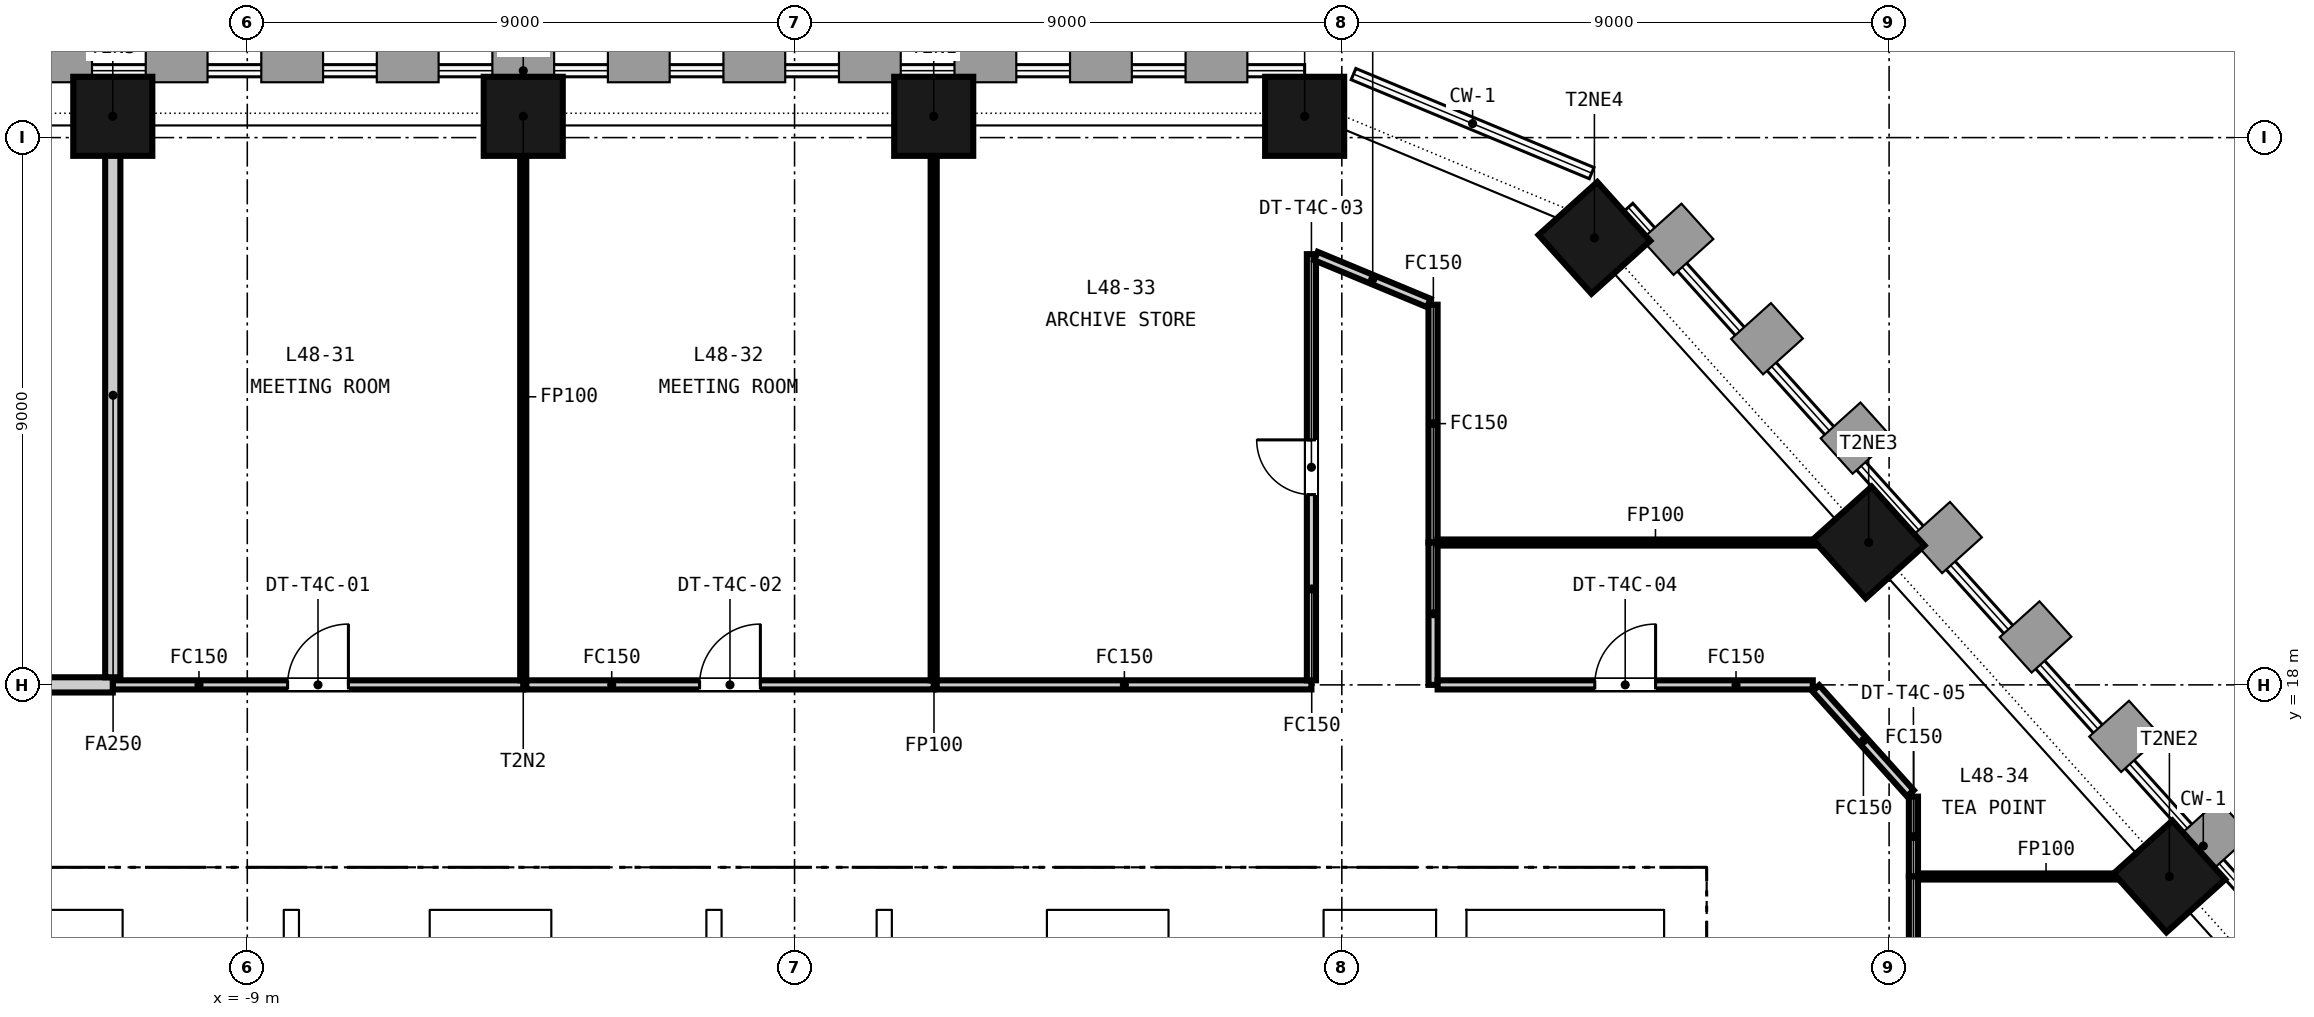
"""IFC4 building model, lengths in metres.
Left out: names, types, materials, properties, quantities, classifications, styles, units other than length and angle.
Written with IfcOpenShell. Run it as: python <this file> out.ifc"""

import sys

from ifc_helpers import new_model, si_unit, direction, frame, frame_2d, origin, origin_2d, place, context, subcontext, project, spatial, rectangle, extrude, element, fill, save


model = new_model("IFC4")
c1 = context("Model", 3, precision=1e-05, world=origin(), true_north=direction((0.0, 1.0)))
c2 = subcontext(c1, "Body", "Model", "MODEL_VIEW")
j1 = project(units=[si_unit("LENGTHUNIT", "METRE"), si_unit("PLANEANGLEUNIT", "RADIAN")], contexts=[c1])
p1 = place(None, origin())
s1 = spatial("IfcSite", under=j1, at=p1, CompositionType="ELEMENT")
p2 = place(p1, origin())
s2 = spatial("IfcBuilding", under=s1, at=p2, CompositionType="ELEMENT")
p3 = place(p2, frame((0.0, 0.0, 192.7)))
s3 = spatial("IfcBuildingStorey", under=s2, at=p3, CompositionType="ELEMENT", Elevation=192.7)
p4 = place(p3, frame((-15.0, 14.65, -0.15), z_axis=(0.0, 0.0, 1.0), x_axis=(1.0, 0.0, 0.0)))
e1 = element("IfcWall", 1, at=p4, inside=s3, PredefinedType="SOLIDWALL", context=c2, shape_type="SweptSolid", body=[
    extrude(rectangle(XDim=30.0, YDim=0.7, at=frame_2d((15.0, 0.0))), origin(), (0.0, 0.0, 1.0), 3.65),
])
p5 = place(p4, frame((9.25, 0.0, 0.15)))
e2 = element("IfcOpeningElement", 2, at=p5, cuts=e1, PredefinedType="OPENING", context=c2, shape_type="SweptSolid", body=[
    extrude(rectangle(XDim=1.5, YDim=2.1, at=frame_2d((0.75, 1.05))), frame((0.0, 0.36, 0.0), z_axis=(0.0, -1.0, 0.0), x_axis=(1.0, 0.0, 0.0)), (0.0, 0.0, 1.0), 0.72),
])
p6 = place(p4, frame((19.4, 0.0, 0.15)))
e3 = element("IfcOpeningElement", 3, at=p6, cuts=e1, PredefinedType="OPENING", context=c2, shape_type="SweptSolid", body=[
    extrude(rectangle(XDim=1.5, YDim=2.1, at=frame_2d((0.75, 1.05))), frame((0.0, 0.36, 0.0), z_axis=(0.0, -1.0, 0.0), x_axis=(1.0, 0.0, 0.0)), (0.0, 0.0, 1.0), 0.72),
])
p7 = place(p4, frame((1.5, 0.0, 0.15)))
e4 = element("IfcOpeningElement", 4, at=p7, cuts=e1, PredefinedType="OPENING", context=c2, shape_type="SweptSolid", body=[
    extrude(rectangle(XDim=1.2, YDim=2.1, at=frame_2d((0.6, 1.05))), frame((0.0, 0.36, 0.0), z_axis=(0.0, -1.0, 0.0), x_axis=(1.0, 0.0, 0.0)), (0.0, 0.0, 1.0), 0.72),
])
p8 = place(p4, frame((27.3, 0.0, 0.15)))
e5 = element("IfcOpeningElement", 5, at=p8, cuts=e1, PredefinedType="OPENING", context=c2, shape_type="SweptSolid", body=[
    extrude(rectangle(XDim=1.2, YDim=2.1, at=frame_2d((0.6, 1.05))), frame((0.0, 0.36, 0.0), z_axis=(0.0, -1.0, 0.0), x_axis=(1.0, 0.0, 0.0)), (0.0, 0.0, 1.0), 0.72),
])
p9 = place(p3, frame((14.65, 0.7, -0.15), z_axis=(0.0, 0.0, 1.0), x_axis=(0.0, 1.0, 0.0)))
e6 = element("IfcWall", 6, at=p9, inside=s3, PredefinedType="SOLIDWALL", context=c2, shape_type="SweptSolid", body=[
    extrude(rectangle(XDim=13.6, YDim=0.7, at=frame_2d((6.8, 0.0))), origin(), (0.0, 0.0, 1.0), 3.65),
])
for number, where, z_axis, x_axis in (
    (7, (-10.8, 0.7, -0.15), (0.0, 0.0, 1.0), (0.0, 1.0, 0.0)),
    (8, (10.8, 0.7, -0.15), (0.0, 0.0, 1.0), (0.0, 1.0, 0.0)),
):
    element("IfcWall", number, at=place(p3, frame(where, z_axis=z_axis, x_axis=x_axis)), inside=s3, PredefinedType="SOLIDWALL", context=c2, shape_type="SweptSolid", body=[
        extrude(rectangle(XDim=13.6, YDim=0.5, at=frame_2d((6.8, 0.0))), origin(), (0.0, 0.0, 1.0), 3.65),
    ])
for number, where, z_axis, x_axis in (
    (9, (8.389, 27.35, -0.15), (0.0, 0.0, 1.0), (-1.0, 0.0, 0.0)),
    (10, (2.288, 27.35, -0.15), (0.0, 0.0, 1.0), (-1.0, 0.0, 0.0)),
    (11, (-4.462, 27.35, -0.15), (0.0, 0.0, 1.0), (-1.0, 0.0, 0.0)),
    (12, (-11.212, 27.35, -0.15), (0.0, 0.0, 1.0), (-1.0, 0.0, 0.0)),
    (13, (22.61, 14.849, -0.15), (0.0, 0.0, 1.0), (-0.669, 0.743, 0.0)),
    (14, (17.664, 20.342, -0.15), (0.0, 0.0, 1.0), (-0.669, 0.743, 0.0)),
    (15, (13.154, 25.351, -0.15), (0.0, 0.0, 1.0), (-0.669, 0.743, 0.0)),
):
    element("IfcColumn", number, at=place(p3, frame(where, z_axis=z_axis, x_axis=x_axis)), inside=s3, PredefinedType="COLUMN", context=c2, shape_type="SweptSolid", body=[
        extrude(rectangle(XDim=1.3, YDim=1.3, at=origin_2d()), origin(), (0.0, 0.0, 1.0), 3.65),
    ])
for number, where, z_axis, x_axis in (
    (16, (-8.275, 11.3, 0.0), (0.0, 0.0, 1.0), (0.0, 1.0, 0.0)),
    (17, (-5.875, 11.3, 0.0), (0.0, 0.0, 1.0), (0.0, 1.0, 0.0)),
    (18, (-4.125, 11.3, 0.0), (0.0, 0.0, 1.0), (0.0, 1.0, 0.0)),
    (19, (-1.325, 11.3, 0.0), (0.0, 0.0, 1.0), (0.0, 1.0, 0.0)),
    (20, (1.475, 11.3, 0.0), (0.0, 0.0, 1.0), (0.0, 1.0, 0.0)),
    (21, (4.275, 11.3, 0.0), (0.0, 0.0, 1.0), (0.0, 1.0, 0.0)),
    (22, (6.025, 11.3, 0.0), (0.0, 0.0, 1.0), (0.0, 1.0, 0.0)),
    (23, (8.825, 11.3, 0.0), (0.0, 0.0, 1.0), (0.0, 1.0, 0.0)),
):
    element("IfcWall", number, at=place(p3, frame(where, z_axis=z_axis, x_axis=x_axis)), inside=s3, PredefinedType="PARTITIONING", context=c2, shape_type="SweptSolid", body=[
        extrude(rectangle(XDim=3.0, YDim=0.25, at=frame_2d((1.5, 0.0))), origin(), (0.0, 0.0, 1.0), 3.5),
    ])
p10 = place(p3, frame((14.15, 0.7, 0.0), z_axis=(0.0, 0.0, 1.0), x_axis=(0.0, 1.0, 0.0)))
e24 = element("IfcWall", 24, at=p10, inside=s3, PredefinedType="SOLIDWALL", context=c2, shape_type="SweptSolid", body=[
    extrude(rectangle(XDim=13.6, YDim=0.3, at=frame_2d((6.8, 0.0))), origin(), (0.0, 0.0, 1.0), 3.5),
])
p11 = place(p3, frame((10.5, 24.252, 0.0), z_axis=(0.0, 0.0, 1.0), x_axis=(0.0, -1.0, 0.0)))
e25 = element("IfcWall", 25, at=p11, inside=s3, PredefinedType="PARTITIONING", context=c2, shape_type="SweptSolid", body=[
    extrude(rectangle(XDim=3.911, YDim=0.15, at=frame_2d((1.956, 0.0))), origin(), (0.0, 0.0, 1.0), 2.741),
])
p12 = place(p3, frame((10.5, 20.341, 0.0), z_axis=(0.0, 0.0, 1.0), x_axis=(0.0, -1.0, 0.0)))
e26 = element("IfcWall", 26, at=p12, inside=s3, PredefinedType="PARTITIONING", context=c2, shape_type="SweptSolid", body=[
    extrude(rectangle(XDim=2.341, YDim=0.15, at=frame_2d((1.17, 0.0))), origin(), (0.0, 0.0, 1.0), 2.741),
])
p13 = place(p3, frame((18.4, 16.162, 0.0), z_axis=(0.0, 0.0, 1.0), x_axis=(0.0, -1.0, 0.0)))
e27 = element("IfcWall", 27, at=p13, inside=s3, PredefinedType="PARTITIONING", context=c2, shape_type="SweptSolid", body=[
    extrude(rectangle(XDim=1.313, YDim=0.15, at=frame_2d((0.656, 0.0))), origin(), (0.0, 0.0, 1.0), 2.741),
])
p14 = place(p3, frame((18.4, 14.849, 0.0), z_axis=(0.0, 0.0, 1.0), x_axis=(0.0, -1.0, 0.0)))
e28 = element("IfcWall", 28, at=p14, inside=s3, PredefinedType="PARTITIONING", context=c2, shape_type="SweptSolid", body=[
    extrude(rectangle(XDim=5.492, YDim=0.15, at=frame_2d((2.746, 0.0))), origin(), (0.0, 0.0, 1.0), 2.741),
])
p15 = place(p14, frame((2.246, 0.0, 0.0)))
e29 = element("IfcOpeningElement", 29, at=p15, cuts=e28, PredefinedType="OPENING", context=c2, shape_type="SweptSolid", body=[
    extrude(rectangle(XDim=1.0, YDim=2.1, at=frame_2d((0.5, 1.05))), frame((0.0, 0.085, 0.0), z_axis=(0.0, -1.0, 0.0), x_axis=(1.0, 0.0, 0.0)), (0.0, 0.0, 1.0), 0.17),
])
p16 = place(p3, frame((-11.212, 18.0, 0.0), z_axis=(0.0, 0.0, 1.0), x_axis=(1.0, 0.0, 0.0)))
e30 = element("IfcWall", 30, at=p16, inside=s3, PredefinedType="PARTITIONING", context=c2, shape_type="SweptSolid", body=[
    extrude(rectangle(XDim=6.75, YDim=0.15, at=frame_2d((3.375, 0.0))), origin(), (0.0, 0.0, 1.0), 2.741),
])
p17 = place(p16, frame((2.875, 0.0, 0.0)))
e31 = element("IfcOpeningElement", 31, at=p17, cuts=e30, PredefinedType="OPENING", context=c2, shape_type="SweptSolid", body=[
    extrude(rectangle(XDim=1.0, YDim=2.1, at=frame_2d((0.5, 1.05))), frame((0.0, 0.085, 0.0), z_axis=(0.0, -1.0, 0.0), x_axis=(1.0, 0.0, 0.0)), (0.0, 0.0, 1.0), 0.17),
])
p18 = place(p3, frame((-4.462, 18.075, 0.0), z_axis=(0.0, 0.0, 1.0), x_axis=(0.0, 1.0, 0.0)))
e32 = element("IfcWall", 32, at=p18, inside=s3, PredefinedType="PARTITIONING", context=c2, shape_type="SweptSolid", body=[
    extrude(rectangle(XDim=9.325, YDim=0.1, at=frame_2d((4.663, 0.0))), origin(), (0.0, 0.0, 1.0), 2.741),
])
p19 = place(p3, frame((-4.412, 18.0, 0.0), z_axis=(0.0, 0.0, 1.0), x_axis=(1.0, 0.0, 0.0)))
e33 = element("IfcWall", 33, at=p19, inside=s3, PredefinedType="PARTITIONING", context=c2, shape_type="SweptSolid", body=[
    extrude(rectangle(XDim=6.7, YDim=0.15, at=frame_2d((3.35, 0.0))), origin(), (0.0, 0.0, 1.0), 2.741),
])
p20 = place(p19, frame((2.85, 0.0, 0.0)))
e34 = element("IfcOpeningElement", 34, at=p20, cuts=e33, PredefinedType="OPENING", context=c2, shape_type="SweptSolid", body=[
    extrude(rectangle(XDim=1.0, YDim=2.1, at=frame_2d((0.5, 1.05))), frame((0.0, 0.085, 0.0), z_axis=(0.0, -1.0, 0.0), x_axis=(1.0, 0.0, 0.0)), (0.0, 0.0, 1.0), 0.17),
])
p21 = place(p3, frame((2.288, 18.075, 0.0), z_axis=(0.0, 0.0, 1.0), x_axis=(0.0, 1.0, 0.0)))
e35 = element("IfcWall", 35, at=p21, inside=s3, PredefinedType="PARTITIONING", context=c2, shape_type="SweptSolid", body=[
    extrude(rectangle(XDim=9.325, YDim=0.1, at=frame_2d((4.663, 0.0))), origin(), (0.0, 0.0, 1.0), 2.741),
])
p22 = place(p3, frame((2.338, 18.0, 0.0), z_axis=(0.0, 0.0, 1.0), x_axis=(1.0, 0.0, 0.0)))
e36 = element("IfcWall", 36, at=p22, inside=s3, PredefinedType="PARTITIONING", context=c2, shape_type="SweptSolid", body=[
    extrude(rectangle(XDim=6.162, YDim=0.15, at=frame_2d((3.081, 0.0))), origin(), (0.0, 0.0, 1.0), 2.741),
])
p23 = place(p3, frame((8.5, 18.075, 0.0), z_axis=(0.0, 0.0, 1.0), x_axis=(0.0, 1.0, 0.0)))
e37 = element("IfcWall", 37, at=p23, inside=s3, PredefinedType="PARTITIONING", context=c2, shape_type="SweptSolid", body=[
    extrude(rectangle(XDim=7.008, YDim=0.15, at=frame_2d((3.504, 0.0))), origin(), (0.0, 0.0, 1.0), 2.741),
])
p24 = place(p23, frame((3.054, 0.0, 0.0)))
e38 = element("IfcOpeningElement", 38, at=p24, cuts=e37, PredefinedType="OPENING", context=c2, shape_type="SweptSolid", body=[
    extrude(rectangle(XDim=0.9, YDim=2.1, at=frame_2d((0.45, 1.05))), frame((0.0, 0.085, 0.0), z_axis=(0.0, -1.0, 0.0), x_axis=(1.0, 0.0, 0.0)), (0.0, 0.0, 1.0), 0.17),
])
p25 = place(p3, frame((8.575, 25.052, 0.0), z_axis=(0.0, 0.0, 1.0), x_axis=(0.923468241072, -0.383674872426, 0.0)))
e39 = element("IfcWall", 39, at=p25, inside=s3, PredefinedType="PARTITIONING", context=c2, shape_type="SweptSolid", body=[
    extrude(rectangle(XDim=2.01, YDim=0.15, at=frame_2d((1.005, 0.0))), origin(), (0.0, 0.0, 1.0), 2.741),
])
p26 = place(p3, frame((10.575, 20.341, 0.0), z_axis=(0.0, 0.0, 1.0), x_axis=(1.0, 0.0, 0.0)))
e40 = element("IfcWall", 40, at=p26, inside=s3, PredefinedType="PARTITIONING", context=c2, shape_type="SweptSolid", body=[
    extrude(rectangle(XDim=7.156, YDim=0.1, at=frame_2d((3.578, 0.0))), origin(), (0.0, 0.0, 1.0), 2.741),
])
p27 = place(p3, frame((10.575, 18.0, 0.0), z_axis=(0.0, 0.0, 1.0), x_axis=(1.0, 0.0, 0.0)))
e41 = element("IfcWall", 41, at=p27, inside=s3, PredefinedType="PARTITIONING", context=c2, shape_type="SweptSolid", body=[
    extrude(rectangle(XDim=6.17, YDim=0.15, at=frame_2d((3.085, 0.0))), origin(), (0.0, 0.0, 1.0), 2.741),
])
p28 = place(p27, frame((2.585, 0.0, 0.0)))
e42 = element("IfcOpeningElement", 42, at=p28, cuts=e41, PredefinedType="OPENING", context=c2, shape_type="SweptSolid", body=[
    extrude(rectangle(XDim=1.0, YDim=2.1, at=frame_2d((0.5, 1.05))), frame((0.0, 0.085, 0.0), z_axis=(0.0, -1.0, 0.0), x_axis=(1.0, 0.0, 0.0)), (0.0, 0.0, 1.0), 0.17),
])
p29 = place(p3, frame((16.795, 17.944, 0.0), z_axis=(0.0, 0.0, 1.0), x_axis=(0.669150487814, -0.743126923653, 0.0)))
e43 = element("IfcWall", 43, at=p29, inside=s3, PredefinedType="PARTITIONING", context=c2, shape_type="SweptSolid", body=[
    extrude(rectangle(XDim=2.323, YDim=0.15, at=frame_2d((1.162, 0.0))), origin(), (0.0, 0.0, 1.0), 2.741),
])
p30 = place(p3, frame((18.475, 14.849, 0.0), z_axis=(0.0, 0.0, 1.0), x_axis=(1.0, 0.0, 0.0)))
e44 = element("IfcWall", 44, at=p30, inside=s3, PredefinedType="PARTITIONING", context=c2, shape_type="SweptSolid", body=[
    extrude(rectangle(XDim=4.202, YDim=0.1, at=frame_2d((2.101, 0.0))), origin(), (0.0, 0.0, 1.0), 2.741),
])
p31 = place(p3, frame((-19.997, 18.0, 0.0), z_axis=(0.0, 0.0, 1.0), x_axis=(1.0, 0.0, 0.0)))
e45 = element("IfcWall", 45, at=p31, inside=s3, PredefinedType="PARTITIONING", context=c2, shape_type="SweptSolid", body=[
    extrude(rectangle(XDim=8.785, YDim=0.25, at=frame_2d((4.393, 0.0))), origin(), (0.0, 0.0, 1.0), 2.741),
])
p32 = place(p3, frame((-11.212, 18.125, 0.0), z_axis=(0.0, 0.0, 1.0), x_axis=(0.0, 1.0, 0.0)))
e46 = element("IfcWall", 46, at=p32, inside=s3, PredefinedType="PARTITIONING", context=c2, shape_type="SweptSolid", body=[
    extrude(rectangle(XDim=9.275, YDim=0.25, at=frame_2d((4.637, 0.0))), origin(), (0.0, 0.0, 1.0), 2.741),
])
p33 = place(p5, origin())
e47 = element("IfcDoor", 47, at=p33, inside=s3, OperationType="DOUBLE_DOOR_SINGLE_SWING", PredefinedType="DOOR", context=c2, shape_type="SweptSolid", body=[
    extrude(rectangle(XDim=1.5, YDim=2.1, at=frame_2d((0.75, 1.05))), frame((0.0, 0.025, 0.0), z_axis=(0.0, -1.0, 0.0), x_axis=(1.0, 0.0, 0.0)), (0.0, 0.0, 1.0), 0.05),
])
fill(e2, e47)
p34 = place(p6, origin())
e48 = element("IfcDoor", 48, at=p34, inside=s3, OperationType="DOUBLE_DOOR_SINGLE_SWING", PredefinedType="DOOR", context=c2, shape_type="SweptSolid", body=[
    extrude(rectangle(XDim=1.5, YDim=2.1, at=frame_2d((0.75, 1.05))), frame((0.0, 0.025, 0.0), z_axis=(0.0, -1.0, 0.0), x_axis=(1.0, 0.0, 0.0)), (0.0, 0.0, 1.0), 0.05),
])
fill(e3, e48)
p35 = place(p8, origin())
e49 = element("IfcDoor", 49, at=p35, inside=s3, OperationType="SINGLE_SWING_LEFT", PredefinedType="DOOR", context=c2, shape_type="SweptSolid", body=[
    extrude(rectangle(XDim=1.2, YDim=2.1, at=frame_2d((0.6, 1.05))), frame((0.0, 0.025, 0.0), z_axis=(0.0, -1.0, 0.0), x_axis=(1.0, 0.0, 0.0)), (0.0, 0.0, 1.0), 0.05),
])
fill(e5, e49)
p36 = place(p17, origin())
e50 = element("IfcDoor", 50, at=p36, inside=s3, OperationType="SINGLE_SWING_RIGHT", PredefinedType="DOOR", context=c2, shape_type="SweptSolid", body=[
    extrude(rectangle(XDim=1.0, YDim=2.1, at=frame_2d((0.5, 1.05))), frame((0.0, 0.025, 0.0), z_axis=(0.0, -1.0, 0.0), x_axis=(1.0, 0.0, 0.0)), (0.0, 0.0, 1.0), 0.05),
])
fill(e31, e50)
p37 = place(p20, origin())
e51 = element("IfcDoor", 51, at=p37, inside=s3, OperationType="SINGLE_SWING_RIGHT", PredefinedType="DOOR", context=c2, shape_type="SweptSolid", body=[
    extrude(rectangle(XDim=1.0, YDim=2.1, at=frame_2d((0.5, 1.05))), frame((0.0, 0.025, 0.0), z_axis=(0.0, -1.0, 0.0), x_axis=(1.0, 0.0, 0.0)), (0.0, 0.0, 1.0), 0.05),
])
fill(e34, e51)
p38 = place(p24, origin())
e52 = element("IfcDoor", 52, at=p38, inside=s3, OperationType="SINGLE_SWING_RIGHT", PredefinedType="DOOR", context=c2, shape_type="SweptSolid", body=[
    extrude(rectangle(XDim=0.9, YDim=2.1, at=frame_2d((0.45, 1.05))), frame((0.0, 0.025, 0.0), z_axis=(0.0, -1.0, 0.0), x_axis=(1.0, 0.0, 0.0)), (0.0, 0.0, 1.0), 0.05),
])
fill(e38, e52)
p39 = place(p28, origin())
e53 = element("IfcDoor", 53, at=p39, inside=s3, OperationType="SINGLE_SWING_RIGHT", PredefinedType="DOOR", context=c2, shape_type="SweptSolid", body=[
    extrude(rectangle(XDim=1.0, YDim=2.1, at=frame_2d((0.5, 1.05))), frame((0.0, 0.025, 0.0), z_axis=(0.0, -1.0, 0.0), x_axis=(1.0, 0.0, 0.0)), (0.0, 0.0, 1.0), 0.05),
])
fill(e42, e53)
save(model, sys.argv[1])
